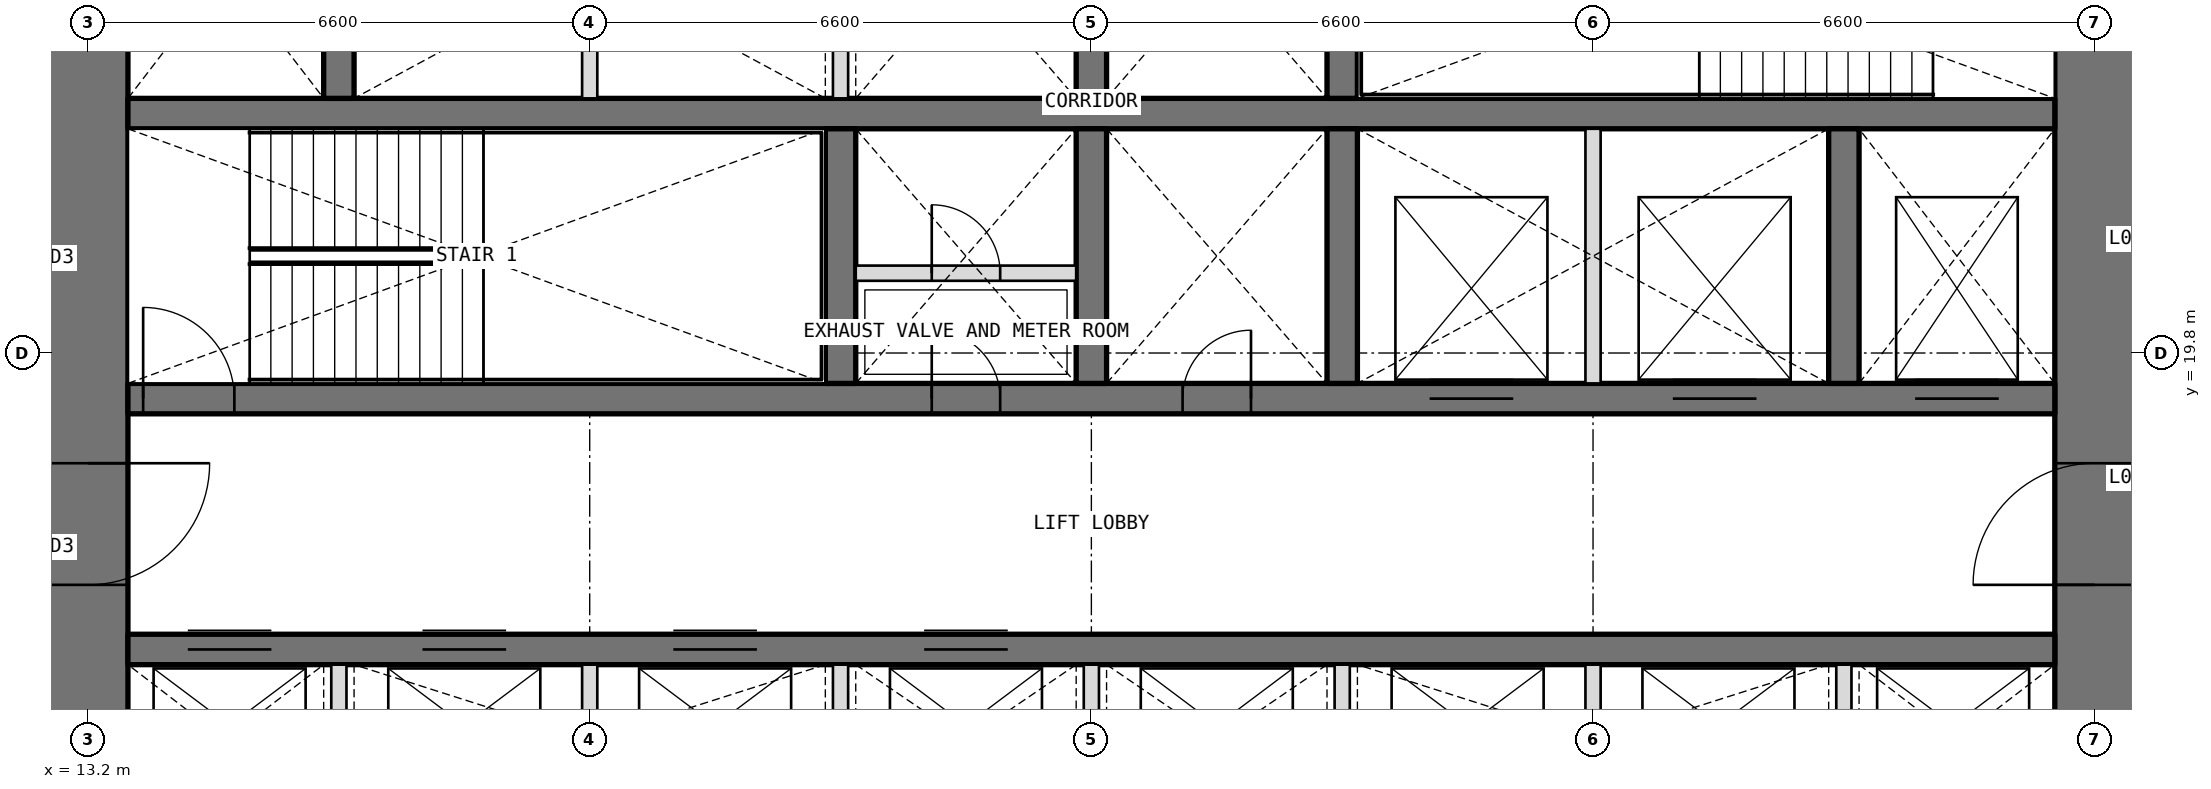
"""IFC4 building model, lengths in metres.
Left out: names, types, materials, properties, quantities, classifications, styles, units other than length and angle.
Written with IfcOpenShell. Run it as: python <this file> out.ifc"""

import sys

from ifc_helpers import new_model, si_unit, direction, frame, frame_2d, origin, place, context, subcontext, project, spatial, rectangle, extrude, element, fill, save


model = new_model("IFC4")
c1 = context("Model", 3, precision=1e-05, world=origin(), true_north=direction((0.0, 1.0)))
c2 = subcontext(c1, "Body", "Model", "MODEL_VIEW")
j1 = project(units=[si_unit("LENGTHUNIT", "METRE"), si_unit("PLANEANGLEUNIT", "RADIAN")], contexts=[c1])
p1 = place(None, origin())
s1 = spatial("IfcSite", under=j1, at=p1, CompositionType="ELEMENT")
p2 = place(p1, origin())
s2 = spatial("IfcBuilding", under=s1, at=p2, CompositionType="ELEMENT")
p3 = place(p2, frame((0.0, 0.0, 38.1)))
s3 = spatial("IfcBuildingStorey", under=s2, at=p3, CompositionType="ELEMENT", Elevation=38.1)
p4 = place(p3, frame((39.6, 13.725, 0.0), z_axis=(0.0, 0.0, 1.0), x_axis=(0.0, 1.0, 0.0)))
e1 = element("IfcWall", 1, at=p4, inside=s3, PredefinedType="SHEAR", context=c2, shape_type="SweptSolid", body=[
    extrude(rectangle(XDim=18.75, YDim=1.05, at=frame_2d((9.375, 0.0))), origin(), (0.0, 0.0, 1.0), 4.2),
])
p5 = place(p4, frame((3.025, 0.0, 0.0)))
e2 = element("IfcOpeningElement", 2, at=p5, cuts=e1, PredefinedType="OPENING", context=c2, shape_type="SweptSolid", body=[
    extrude(rectangle(XDim=1.6, YDim=2.1, at=frame_2d((0.8, 1.05))), frame((0.0, 0.535, 0.0), z_axis=(0.0, -1.0, 0.0), x_axis=(1.0, 0.0, 0.0)), (0.0, 0.0, 1.0), 1.07),
])
p6 = place(p4, frame((13.825, 0.0, 0.0)))
e3 = element("IfcOpeningElement", 3, at=p6, cuts=e1, PredefinedType="OPENING", context=c2, shape_type="SweptSolid", body=[
    extrude(rectangle(XDim=1.6, YDim=2.1, at=frame_2d((0.8, 1.05))), frame((0.0, 0.535, 0.0), z_axis=(0.0, -1.0, 0.0), x_axis=(1.0, 0.0, 0.0)), (0.0, 0.0, 1.0), 1.07),
])
p7 = place(p3, frame((13.2, 32.475, 0.0), z_axis=(0.0, 0.0, 1.0), x_axis=(0.0, -1.0, 0.0)))
e4 = element("IfcWall", 4, at=p7, inside=s3, PredefinedType="SHEAR", context=c2, shape_type="SweptSolid", body=[
    extrude(rectangle(XDim=18.75, YDim=1.05, at=frame_2d((9.375, 0.0))), origin(), (0.0, 0.0, 1.0), 4.2),
])
p8 = place(p7, frame((14.125, 0.0, 0.0)))
e5 = element("IfcOpeningElement", 5, at=p8, cuts=e4, PredefinedType="OPENING", context=c2, shape_type="SweptSolid", body=[
    extrude(rectangle(XDim=1.6, YDim=2.1, at=frame_2d((0.8, 1.05))), frame((0.0, 0.535, 0.0), z_axis=(0.0, -1.0, 0.0), x_axis=(1.0, 0.0, 0.0)), (0.0, 0.0, 1.0), 1.07),
])
p9 = place(p7, frame((3.325, 0.0, 0.0)))
e6 = element("IfcOpeningElement", 6, at=p9, cuts=e4, PredefinedType="OPENING", context=c2, shape_type="SweptSolid", body=[
    extrude(rectangle(XDim=1.6, YDim=2.1, at=frame_2d((0.8, 1.05))), frame((0.0, 0.535, 0.0), z_axis=(0.0, -1.0, 0.0), x_axis=(1.0, 0.0, 0.0)), (0.0, 0.0, 1.0), 1.07),
])
p10 = place(p3, frame((13.725, 15.9, 0.0), z_axis=(0.0, 0.0, 1.0), x_axis=(1.0, 0.0, 0.0)))
e7 = element("IfcWall", 7, at=p10, inside=s3, PredefinedType="SHEAR", context=c2, shape_type="SweptSolid", body=[
    extrude(rectangle(XDim=25.35, YDim=0.4, at=frame_2d((12.675, 0.0))), origin(), (0.0, 0.0, 1.0), 4.2),
])
p11 = place(p10, frame((0.788, 0.0, 0.0)))
e8 = element("IfcOpeningElement", 8, at=p11, cuts=e7, PredefinedType="OPENING", context=c2, shape_type="SweptSolid", body=[
    extrude(rectangle(XDim=1.1, YDim=2.1, at=frame_2d((0.55, 1.05))), frame((0.0, 0.21, 0.0), z_axis=(0.0, -1.0, 0.0), x_axis=(1.0, 0.0, 0.0)), (0.0, 0.0, 1.0), 0.42),
])
p12 = place(p10, frame((3.875, 0.0, 0.0)))
e9 = element("IfcOpeningElement", 9, at=p12, cuts=e7, PredefinedType="OPENING", context=c2, shape_type="SweptSolid", body=[
    extrude(rectangle(XDim=1.1, YDim=2.1, at=frame_2d((0.55, 1.05))), frame((0.0, 0.21, 0.0), z_axis=(0.0, -1.0, 0.0), x_axis=(1.0, 0.0, 0.0)), (0.0, 0.0, 1.0), 0.42),
])
p13 = place(p10, frame((7.175, 0.0, 0.0)))
e10 = element("IfcOpeningElement", 10, at=p13, cuts=e7, PredefinedType="OPENING", context=c2, shape_type="SweptSolid", body=[
    extrude(rectangle(XDim=1.1, YDim=2.1, at=frame_2d((0.55, 1.05))), frame((0.0, 0.21, 0.0), z_axis=(0.0, -1.0, 0.0), x_axis=(1.0, 0.0, 0.0)), (0.0, 0.0, 1.0), 0.42),
])
p14 = place(p10, frame((10.475, 0.0, 0.0)))
e11 = element("IfcOpeningElement", 11, at=p14, cuts=e7, PredefinedType="OPENING", context=c2, shape_type="SweptSolid", body=[
    extrude(rectangle(XDim=1.1, YDim=2.1, at=frame_2d((0.55, 1.05))), frame((0.0, 0.21, 0.0), z_axis=(0.0, -1.0, 0.0), x_axis=(1.0, 0.0, 0.0)), (0.0, 0.0, 1.0), 0.42),
])
p15 = place(p3, frame((13.725, 19.2, 0.0), z_axis=(0.0, 0.0, 1.0), x_axis=(1.0, 0.0, 0.0)))
e12 = element("IfcWall", 12, at=p15, inside=s3, PredefinedType="SHEAR", context=c2, shape_type="SweptSolid", body=[
    extrude(rectangle(XDim=25.35, YDim=0.4, at=frame_2d((12.675, 0.0))), origin(), (0.0, 0.0, 1.0), 4.2),
])
p16 = place(p15, frame((10.575, 0.0, 0.0)))
e13 = element("IfcOpeningElement", 13, at=p16, cuts=e12, PredefinedType="OPENING", context=c2, shape_type="SweptSolid", body=[
    extrude(rectangle(XDim=0.9, YDim=2.1, at=frame_2d((0.45, 1.05))), frame((0.0, 0.21, 0.0), z_axis=(0.0, -1.0, 0.0), x_axis=(1.0, 0.0, 0.0)), (0.0, 0.0, 1.0), 0.42),
])
p17 = place(p15, frame((13.875, 0.0, 0.0)))
e14 = element("IfcOpeningElement", 14, at=p17, cuts=e12, PredefinedType="OPENING", context=c2, shape_type="SweptSolid", body=[
    extrude(rectangle(XDim=0.9, YDim=2.1, at=frame_2d((0.45, 1.05))), frame((0.0, 0.21, 0.0), z_axis=(0.0, -1.0, 0.0), x_axis=(1.0, 0.0, 0.0)), (0.0, 0.0, 1.0), 0.42),
])
p18 = place(p15, frame((0.2, 0.0, 0.0)))
e15 = element("IfcOpeningElement", 15, at=p18, cuts=e12, PredefinedType="OPENING", context=c2, shape_type="SweptSolid", body=[
    extrude(rectangle(XDim=1.2, YDim=2.1, at=frame_2d((0.6, 1.05))), frame((0.0, 0.21, 0.0), z_axis=(0.0, -1.0, 0.0), x_axis=(1.0, 0.0, 0.0)), (0.0, 0.0, 1.0), 0.42),
])
p19 = place(p15, frame((23.512, 0.0, 0.0)))
e16 = element("IfcOpeningElement", 16, at=p19, cuts=e12, PredefinedType="OPENING", context=c2, shape_type="SweptSolid", body=[
    extrude(rectangle(XDim=1.1, YDim=2.1, at=frame_2d((0.55, 1.05))), frame((0.0, 0.21, 0.0), z_axis=(0.0, -1.0, 0.0), x_axis=(1.0, 0.0, 0.0)), (0.0, 0.0, 1.0), 0.42),
])
p20 = place(p15, frame((17.125, 0.0, 0.0)))
e17 = element("IfcOpeningElement", 17, at=p20, cuts=e12, PredefinedType="OPENING", context=c2, shape_type="SweptSolid", body=[
    extrude(rectangle(XDim=1.1, YDim=2.1, at=frame_2d((0.55, 1.05))), frame((0.0, 0.21, 0.0), z_axis=(0.0, -1.0, 0.0), x_axis=(1.0, 0.0, 0.0)), (0.0, 0.0, 1.0), 0.42),
])
p21 = place(p15, frame((20.325, 0.0, 0.0)))
e18 = element("IfcOpeningElement", 18, at=p21, cuts=e12, PredefinedType="OPENING", context=c2, shape_type="SweptSolid", body=[
    extrude(rectangle(XDim=1.1, YDim=2.1, at=frame_2d((0.55, 1.05))), frame((0.0, 0.21, 0.0), z_axis=(0.0, -1.0, 0.0), x_axis=(1.0, 0.0, 0.0)), (0.0, 0.0, 1.0), 0.42),
])
p22 = place(p3, frame((13.725, 22.95, 0.0), z_axis=(0.0, 0.0, 1.0), x_axis=(1.0, 0.0, 0.0)))
e19 = element("IfcWall", 19, at=p22, inside=s3, PredefinedType="SHEAR", context=c2, shape_type="SweptSolid", body=[
    extrude(rectangle(XDim=25.35, YDim=0.4, at=frame_2d((12.675, 0.0))), origin(), (0.0, 0.0, 1.0), 4.2),
])
for number, where, z_axis, x_axis in (
    (20, (23.1, 19.4, 0.0), (0.0, 0.0, 1.0), (0.0, 1.0, 0.0)),
    (21, (26.4, 19.4, 0.0), (0.0, 0.0, 1.0), (0.0, 1.0, 0.0)),
    (22, (29.7, 19.4, 0.0), (0.0, 0.0, 1.0), (0.0, 1.0, 0.0)),
    (23, (36.3, 19.4, 0.0), (0.0, 0.0, 1.0), (0.0, 1.0, 0.0)),
    (24, (16.5, 23.15, 0.0), (0.0, 0.0, 1.0), (0.0, 1.0, 0.0)),
    (25, (26.4, 23.15, 0.0), (0.0, 0.0, 1.0), (0.0, 1.0, 0.0)),
    (26, (29.7, 23.15, 0.0), (0.0, 0.0, 1.0), (0.0, 1.0, 0.0)),
):
    element("IfcWall", number, at=place(p3, frame(where, z_axis=z_axis, x_axis=x_axis)), inside=s3, PredefinedType="SHEAR", context=c2, shape_type="SweptSolid", body=[
        extrude(rectangle(XDim=3.35, YDim=0.4, at=frame_2d((1.675, 0.0))), origin(), (0.0, 0.0, 1.0), 4.2),
    ])
for number, where, z_axis, x_axis in (
    (27, (16.5, 13.725, 0.0), (0.0, 0.0, 1.0), (0.0, 1.0, 0.0)),
    (28, (19.8, 13.725, 0.0), (0.0, 0.0, 1.0), (0.0, 1.0, 0.0)),
    (29, (23.1, 13.725, 0.0), (0.0, 0.0, 1.0), (0.0, 1.0, 0.0)),
    (30, (26.4, 13.725, 0.0), (0.0, 0.0, 1.0), (0.0, 1.0, 0.0)),
    (31, (29.7, 13.725, 0.0), (0.0, 0.0, 1.0), (0.0, 1.0, 0.0)),
    (32, (33.0, 13.725, 0.0), (0.0, 0.0, 1.0), (0.0, 1.0, 0.0)),
    (33, (36.3, 13.725, 0.0), (0.0, 0.0, 1.0), (0.0, 1.0, 0.0)),
):
    element("IfcWall", number, at=place(p3, frame(where, z_axis=z_axis, x_axis=x_axis)), inside=s3, PredefinedType="PARTITIONING", context=c2, shape_type="SweptSolid", body=[
        extrude(rectangle(XDim=1.975, YDim=0.2, at=frame_2d((0.987, 0.0))), origin(), (0.0, 0.0, 1.0), 4.2),
    ])
for number, where, z_axis, x_axis in (
    (34, (33.0, 19.4, 0.0), (0.0, 0.0, 1.0), (0.0, 1.0, 0.0)),
    (35, (19.8, 23.15, 0.0), (0.0, 0.0, 1.0), (0.0, 1.0, 0.0)),
    (36, (23.1, 23.15, 0.0), (0.0, 0.0, 1.0), (0.0, 1.0, 0.0)),
):
    element("IfcWall", number, at=place(p3, frame(where, z_axis=z_axis, x_axis=x_axis)), inside=s3, PredefinedType="PARTITIONING", context=c2, shape_type="SweptSolid", body=[
        extrude(rectangle(XDim=3.35, YDim=0.2, at=frame_2d((1.675, 0.0))), origin(), (0.0, 0.0, 1.0), 4.2),
    ])
p23 = place(p3, frame((23.3, 20.85, 0.0), z_axis=(0.0, 0.0, 1.0), x_axis=(1.0, 0.0, 0.0)))
e37 = element("IfcWall", 37, at=p23, inside=s3, PredefinedType="PARTITIONING", context=c2, shape_type="SweptSolid", body=[
    extrude(rectangle(XDim=2.9, YDim=0.2, at=frame_2d((1.45, 0.0))), origin(), (0.0, 0.0, 1.0), 3.9),
])
p24 = place(p23, frame((1.0, 0.0, 0.0)))
e38 = element("IfcOpeningElement", 38, at=p24, cuts=e37, PredefinedType="OPENING", context=c2, shape_type="SweptSolid", body=[
    extrude(rectangle(XDim=0.9, YDim=2.1, at=frame_2d((0.45, 1.05))), frame((0.0, 0.11, 0.0), z_axis=(0.0, -1.0, 0.0), x_axis=(1.0, 0.0, 0.0)), (0.0, 0.0, 1.0), 0.22),
])
p25 = place(p16, origin())
e39 = element("IfcDoor", 39, at=p25, inside=s3, OperationType="SINGLE_SWING_LEFT", PredefinedType="DOOR", context=c2, shape_type="SweptSolid", body=[
    extrude(rectangle(XDim=0.9, YDim=2.1, at=frame_2d((0.45, 1.05))), frame((0.0, 0.025, 0.0), z_axis=(0.0, -1.0, 0.0), x_axis=(1.0, 0.0, 0.0)), (0.0, 0.0, 1.0), 0.05),
])
fill(e13, e39)
p26 = place(p24, origin())
e40 = element("IfcDoor", 40, at=p26, inside=s3, OperationType="SINGLE_SWING_LEFT", PredefinedType="DOOR", context=c2, shape_type="SweptSolid", body=[
    extrude(rectangle(XDim=0.9, YDim=2.1, at=frame_2d((0.45, 1.05))), frame((0.0, 0.025, 0.0), z_axis=(0.0, -1.0, 0.0), x_axis=(1.0, 0.0, 0.0)), (0.0, 0.0, 1.0), 0.05),
])
fill(e38, e40)
p27 = place(p17, origin())
e41 = element("IfcDoor", 41, at=p27, inside=s3, OperationType="SINGLE_SWING_RIGHT", PredefinedType="DOOR", context=c2, shape_type="SweptSolid", body=[
    extrude(rectangle(XDim=0.9, YDim=2.1, at=frame_2d((0.45, 1.05))), frame((0.0, 0.025, 0.0), z_axis=(0.0, -1.0, 0.0), x_axis=(1.0, 0.0, 0.0)), (0.0, 0.0, 1.0), 0.05),
])
fill(e14, e41)
p28 = place(p18, origin())
e42 = element("IfcDoor", 42, at=p28, inside=s3, OperationType="SINGLE_SWING_LEFT", PredefinedType="DOOR", context=c2, shape_type="SweptSolid", body=[
    extrude(rectangle(XDim=1.2, YDim=2.1, at=frame_2d((0.6, 1.05))), frame((0.0, 0.025, 0.0), z_axis=(0.0, -1.0, 0.0), x_axis=(1.0, 0.0, 0.0)), (0.0, 0.0, 1.0), 0.05),
])
fill(e15, e42)
p29 = place(p8, origin())
e43 = element("IfcDoor", 43, at=p29, inside=s3, OperationType="DOUBLE_DOOR_DOUBLE_SWING", PredefinedType="DOOR", context=c2, shape_type="SweptSolid", body=[
    extrude(rectangle(XDim=1.6, YDim=2.1, at=frame_2d((0.8, 1.05))), frame((0.0, 0.025, 0.0), z_axis=(0.0, -1.0, 0.0), x_axis=(1.0, 0.0, 0.0)), (0.0, 0.0, 1.0), 0.05),
])
fill(e5, e43)
p30 = place(p5, origin())
e44 = element("IfcDoor", 44, at=p30, inside=s3, OperationType="DOUBLE_DOOR_DOUBLE_SWING", PredefinedType="DOOR", context=c2, shape_type="SweptSolid", body=[
    extrude(rectangle(XDim=1.6, YDim=2.1, at=frame_2d((0.8, 1.05))), frame((0.0, 0.025, 0.0), z_axis=(0.0, -1.0, 0.0), x_axis=(1.0, 0.0, 0.0)), (0.0, 0.0, 1.0), 0.05),
])
fill(e2, e44)
p31 = place(p11, origin())
e45 = element("IfcDoor", 45, at=p31, inside=s3, OperationType="DOUBLE_DOOR_SLIDING", PredefinedType="DOOR", context=c2, shape_type="SweptSolid", body=[
    extrude(rectangle(XDim=1.1, YDim=2.1, at=frame_2d((0.55, 1.05))), frame((0.0, 0.025, 0.0), z_axis=(0.0, -1.0, 0.0), x_axis=(1.0, 0.0, 0.0)), (0.0, 0.0, 1.0), 0.05),
])
fill(e8, e45)
p32 = place(p12, origin())
e46 = element("IfcDoor", 46, at=p32, inside=s3, OperationType="DOUBLE_DOOR_SLIDING", PredefinedType="DOOR", context=c2, shape_type="SweptSolid", body=[
    extrude(rectangle(XDim=1.1, YDim=2.1, at=frame_2d((0.55, 1.05))), frame((0.0, 0.025, 0.0), z_axis=(0.0, -1.0, 0.0), x_axis=(1.0, 0.0, 0.0)), (0.0, 0.0, 1.0), 0.05),
])
fill(e9, e46)
p33 = place(p13, origin())
e47 = element("IfcDoor", 47, at=p33, inside=s3, OperationType="DOUBLE_DOOR_SLIDING", PredefinedType="DOOR", context=c2, shape_type="SweptSolid", body=[
    extrude(rectangle(XDim=1.1, YDim=2.1, at=frame_2d((0.55, 1.05))), frame((0.0, 0.025, 0.0), z_axis=(0.0, -1.0, 0.0), x_axis=(1.0, 0.0, 0.0)), (0.0, 0.0, 1.0), 0.05),
])
fill(e10, e47)
p34 = place(p14, origin())
e48 = element("IfcDoor", 48, at=p34, inside=s3, OperationType="DOUBLE_DOOR_SLIDING", PredefinedType="DOOR", context=c2, shape_type="SweptSolid", body=[
    extrude(rectangle(XDim=1.1, YDim=2.1, at=frame_2d((0.55, 1.05))), frame((0.0, 0.025, 0.0), z_axis=(0.0, -1.0, 0.0), x_axis=(1.0, 0.0, 0.0)), (0.0, 0.0, 1.0), 0.05),
])
fill(e11, e48)
p35 = place(p19, origin())
e49 = element("IfcDoor", 49, at=p35, inside=s3, OperationType="DOUBLE_DOOR_SLIDING", PredefinedType="DOOR", context=c2, shape_type="SweptSolid", body=[
    extrude(rectangle(XDim=1.1, YDim=2.1, at=frame_2d((0.55, 1.05))), frame((0.0, 0.025, 0.0), z_axis=(0.0, -1.0, 0.0), x_axis=(1.0, 0.0, 0.0)), (0.0, 0.0, 1.0), 0.05),
])
fill(e16, e49)
p36 = place(p20, origin())
e50 = element("IfcDoor", 50, at=p36, inside=s3, OperationType="DOUBLE_DOOR_SLIDING", PredefinedType="DOOR", context=c2, shape_type="SweptSolid", body=[
    extrude(rectangle(XDim=1.1, YDim=2.1, at=frame_2d((0.55, 1.05))), frame((0.0, 0.025, 0.0), z_axis=(0.0, -1.0, 0.0), x_axis=(1.0, 0.0, 0.0)), (0.0, 0.0, 1.0), 0.05),
])
fill(e17, e50)
p37 = place(p21, origin())
e51 = element("IfcDoor", 51, at=p37, inside=s3, OperationType="DOUBLE_DOOR_SLIDING", PredefinedType="DOOR", context=c2, shape_type="SweptSolid", body=[
    extrude(rectangle(XDim=1.1, YDim=2.1, at=frame_2d((0.55, 1.05))), frame((0.0, 0.025, 0.0), z_axis=(0.0, -1.0, 0.0), x_axis=(1.0, 0.0, 0.0)), (0.0, 0.0, 1.0), 0.05),
])
fill(e18, e51)
save(model, sys.argv[1])
